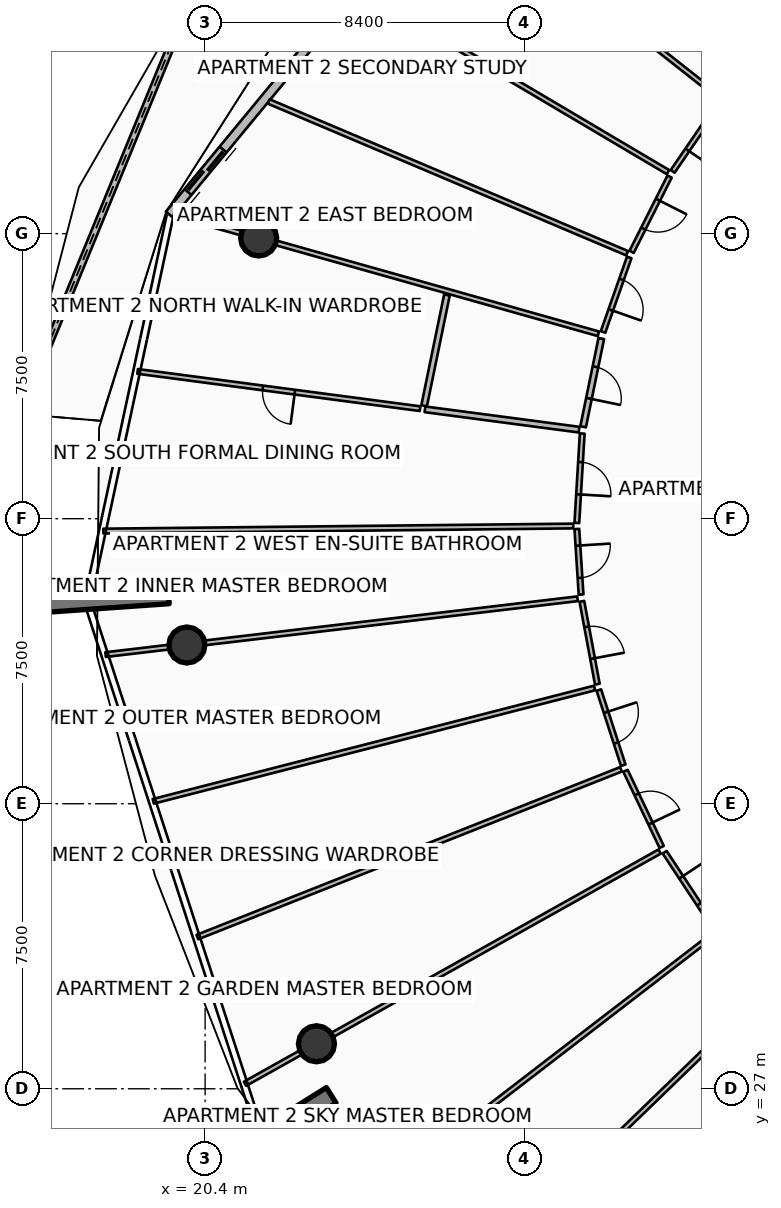
"""IFC4 building model, lengths in metres.
Left out: names, types, materials, properties, quantities, classifications, styles, units other than length and angle.
Written with IfcOpenShell. Run it as: python <this file> out.ifc"""

import sys

from ifc_helpers import new_model, si_unit, direction, frame, frame_2d, origin, origin_2d, place, context, subcontext, project, spatial, polyline, rectangle, circle, outline, extrude, element, fill, save


model = new_model("IFC4")
c1 = context("Model", 3, precision=1e-05, world=origin(), true_north=direction((0.0, 1.0)))
c2 = subcontext(c1, "Body", "Model", "MODEL_VIEW")
j1 = project(units=[si_unit("LENGTHUNIT", "METRE"), si_unit("PLANEANGLEUNIT", "RADIAN")], contexts=[c1])
p1 = place(None, origin())
s1 = spatial("IfcSite", under=j1, at=p1, CompositionType="ELEMENT")
p2 = place(p1, origin())
s2 = spatial("IfcBuilding", under=s1, at=p2, CompositionType="ELEMENT")
p3 = place(p2, frame((0.0, 0.0, 236.7)))
s3 = spatial("IfcBuildingStorey", under=s2, at=p3, CompositionType="ELEMENT", Elevation=236.7)
p4 = place(p3, frame((19.438, 40.003, 0.0), z_axis=(0.0, 0.0, 1.0), x_axis=(-0.997563824095, -0.069759707979, 0.0)))
e1 = element("IfcWall", 1, at=p4, inside=s3, PredefinedType="SOLIDWALL", context=c2, shape_type="SweptSolid", body=[
    extrude(rectangle(XDim=3.5, YDim=0.48, at=frame_2d((1.75, 0.0))), origin(), (0.0, 0.0, 1.0), 3.85),
])
p5 = place(p3, frame((23.719, 26.827, 0.0), z_axis=(0.0, 0.0, 1.0), x_axis=(-0.848033572426, -0.529942506352, 0.0)))
e2 = element("IfcWall", 2, at=p5, inside=s3, PredefinedType="SOLIDWALL", context=c2, shape_type="SweptSolid", body=[
    extrude(rectangle(XDim=3.5, YDim=0.48, at=frame_2d((1.75, 0.0))), origin(), (0.0, 0.0, 1.0), 3.85),
])
for number, where, z_axis, x_axis in (
    (3, (21.809, 49.387, 0.0), (0.0, 0.0, 1.0), (1.0, 0.0, 0.0)),
    (4, (19.92, 38.677, 0.0), (0.0, 0.0, 1.0), (1.0, 0.0, 0.0)),
    (5, (23.33, 28.184, 0.0), (0.0, 0.0, 1.0), (1.0, 0.0, 0.0)),
):
    element("IfcColumn", number, at=place(p3, frame(where, z_axis=z_axis, x_axis=x_axis)), inside=s3, PredefinedType="COLUMN", context=c2, shape_type="SweptSolid", body=[
        extrude(circle(Radius=0.475, at=origin_2d()), origin(), (0.0, 0.0, 1.0), 3.59),
    ])
p6 = place(p3, frame((20.162, 56.05, 0.0), z_axis=(0.0, 0.0, 1.0), x_axis=(-0.3796059491, -0.92514827104, 0.0)))
e6 = element("IfcWall", 6, at=p6, inside=s3, PredefinedType="PARAPET", context=c2, shape_type="SweptSolid", body=[
    extrude(outline(polyline([(0.0, 0.0), (12.209, 0.0), (12.208, 1.497), (6.104, 1.696), (0.0, 1.832), (0.0, 0.0)])), frame((0.0, 0.09, 0.0), z_axis=(0.0, -1.0, 0.0), x_axis=(1.0, 0.0, 0.0)), (0.0, 0.0, 1.0), 0.18),
])
p7 = place(p3, frame((26.742, 58.822, 0.0), z_axis=(0.0, 0.0, 1.0), x_axis=(-0.636680093065, -0.771128043255, 0.0)))
e7 = element("IfcWall", 7, at=p7, inside=s3, PredefinedType="SOLIDWALL", context=c2, shape_type="SweptSolid", body=[
    extrude(rectangle(XDim=11.438, YDim=0.24, at=frame_2d((5.719, 0.0))), origin(), (0.0, 0.0, 1.0), 2.54),
])
p8 = place(p7, frame((9.218, 0.0, 0.0)))
e8 = element("IfcOpeningElement", 8, at=p8, cuts=e7, PredefinedType="OPENING", context=c2, shape_type="SweptSolid", body=[
    extrude(rectangle(XDim=1.45, YDim=2.15, at=frame_2d((0.725, 1.075))), frame((0.0, 0.13, 0.0), z_axis=(0.0, -1.0, 0.0), x_axis=(1.0, 0.0, 0.0)), (0.0, 0.0, 1.0), 0.26),
])
p9 = place(p7, frame((0.28, 0.0, 0.65)))
e9 = element("IfcOpeningElement", 9, at=p9, cuts=e7, PredefinedType="OPENING", context=c2, shape_type="SweptSolid", body=[
    extrude(rectangle(XDim=1.6, YDim=1.5, at=frame_2d((0.8, 0.75))), frame((0.0, 0.13, 0.0), z_axis=(0.0, -1.0, 0.0), x_axis=(1.0, 0.0, 0.0)), (0.0, 0.0, 1.0), 0.26),
])
p10 = place(p3, frame((33.924, 53.097, 0.0), z_axis=(0.0, 0.0, 1.0), x_axis=(-0.785328718296, 0.619078996752, 0.0)))
e10 = element("IfcWall", 10, at=p10, inside=s3, PredefinedType="PARTITIONING", context=c2, shape_type="SweptSolid", body=[
    extrude(rectangle(XDim=9.161, YDim=0.125, at=frame_2d((4.58, 0.0))), origin(), (0.0, 0.0, 1.0), 2.957),
])
p11 = place(p3, frame((32.581, 51.119, 0.0), z_axis=(0.0, 0.0, 1.0), x_axis=(-0.860730955096, 0.509060136859, 0.0)))
e11 = element("IfcWall", 11, at=p11, inside=s3, PredefinedType="PARTITIONING", context=c2, shape_type="SweptSolid", body=[
    extrude(rectangle(XDim=9.397, YDim=0.125, at=frame_2d((4.699, 0.0))), origin(), (0.0, 0.0, 1.0), 3.03),
])
p12 = place(p3, frame((31.504, 48.985, 0.0), z_axis=(0.0, 0.0, 1.0), x_axis=(-0.920847777273, 0.389922262882, 0.0)))
e12 = element("IfcWall", 12, at=p12, inside=s3, PredefinedType="PARTITIONING", context=c2, shape_type="SweptSolid", body=[
    extrude(rectangle(XDim=10.241, YDim=0.125, at=frame_2d((5.121, 0.0))), origin(), (0.0, 0.0, 1.0), 3.03),
])
p13 = place(p3, frame((33.957, 52.969, 0.0), z_axis=(0.0, 0.0, 1.0), x_axis=(-0.565322986845, -0.824869638516, 0.0)))
e13 = element("IfcWall", 13, at=p13, inside=s3, PredefinedType="PARTITIONING", context=c2, shape_type="SweptSolid", body=[
    extrude(rectangle(XDim=2.218, YDim=0.125, at=frame_2d((1.109, 0.0))), origin(), (0.0, 0.0, 1.0), 2.957),
])
p14 = place(p13, frame((0.684, 0.0, 0.0)))
e14 = element("IfcOpeningElement", 14, at=p14, cuts=e13, PredefinedType="OPENING", context=c2, shape_type="SweptSolid", body=[
    extrude(rectangle(XDim=0.85, YDim=2.06, at=frame_2d((0.425, 1.03))), frame((0.0, 0.073, 0.0), z_axis=(0.0, -1.0, 0.0), x_axis=(1.0, 0.0, 0.0)), (0.0, 0.0, 1.0), 0.145),
])
p15 = place(p3, frame((32.622, 51.002, 0.0), z_axis=(0.0, 0.0, 1.0), x_axis=(-0.450512619302, -0.892770059898, 0.0)))
e15 = element("IfcWall", 15, at=p15, inside=s3, PredefinedType="PARTITIONING", context=c2, shape_type="SweptSolid", body=[
    extrude(rectangle(XDim=2.218, YDim=0.125, at=frame_2d((1.109, 0.0))), origin(), (0.0, 0.0, 1.0), 3.03),
])
p16 = place(p15, frame((0.684, 0.0, 0.0)))
e16 = element("IfcOpeningElement", 16, at=p16, cuts=e15, PredefinedType="OPENING", context=c2, shape_type="SweptSolid", body=[
    extrude(rectangle(XDim=0.85, YDim=2.06, at=frame_2d((0.425, 1.03))), frame((0.0, 0.073, 0.0), z_axis=(0.0, -1.0, 0.0), x_axis=(1.0, 0.0, 0.0)), (0.0, 0.0, 1.0), 0.145),
])
p17 = place(p3, frame((31.56, 48.875, 0.0), z_axis=(0.0, 0.0, 1.0), x_axis=(-0.331412511401, -0.943485955002, 0.0)))
e17 = element("IfcWall", 17, at=p17, inside=s3, PredefinedType="PARTITIONING", context=c2, shape_type="SweptSolid", body=[
    extrude(rectangle(XDim=2.078, YDim=0.125, at=frame_2d((1.039, 0.0))), origin(), (0.0, 0.0, 1.0), 2.957),
])
p18 = place(p17, frame((0.614, 0.0, 0.0)))
e18 = element("IfcOpeningElement", 18, at=p18, cuts=e17, PredefinedType="OPENING", context=c2, shape_type="SweptSolid", body=[
    extrude(rectangle(XDim=0.85, YDim=2.06, at=frame_2d((0.425, 1.03))), frame((0.0, 0.073, 0.0), z_axis=(0.0, -1.0, 0.0), x_axis=(1.0, 0.0, 0.0)), (0.0, 0.0, 1.0), 0.145),
])
p19 = place(p3, frame((30.749, 46.865, 0.0), z_axis=(0.0, 0.0, 1.0), x_axis=(-0.962453068054, 0.271448138313, 0.0)))
e19 = element("IfcWall", 19, at=p19, inside=s3, PredefinedType="PARTITIONING", context=c2, shape_type="SweptSolid", body=[
    extrude(rectangle(XDim=11.572, YDim=0.125, at=frame_2d((5.786, 0.0))), origin(), (0.0, 0.0, 1.0), 2.957),
])
p20 = place(p3, frame((30.825, 46.74, 0.0), z_axis=(0.0, 0.0, 1.0), x_axis=(-0.201620944177, -0.979463626108, 0.0)))
e20 = element("IfcWall", 20, at=p20, inside=s3, PredefinedType="PARTITIONING", context=c2, shape_type="SweptSolid", body=[
    extrude(rectangle(XDim=2.37, YDim=0.15, at=frame_2d((1.185, 0.0))), origin(), (0.0, 0.0, 1.0), 2.957),
])
p21 = place(p20, frame((0.76, 0.0, 0.0)))
e21 = element("IfcOpeningElement", 21, at=p21, cuts=e20, PredefinedType="OPENING", context=c2, shape_type="SweptSolid", body=[
    extrude(rectangle(XDim=0.85, YDim=2.06, at=frame_2d((0.425, 1.03))), frame((0.0, 0.085, 0.0), z_axis=(0.0, -1.0, 0.0), x_axis=(1.0, 0.0, 0.0)), (0.0, 0.0, 1.0), 0.17),
])
p22 = place(p3, frame((26.763, 47.886, 0.0), z_axis=(0.0, 0.0, 1.0), x_axis=(-0.20166681044, -0.979454183496, 0.0)))
e22 = element("IfcWall", 22, at=p22, inside=s3, PredefinedType="PARTITIONING", context=c2, shape_type="SweptSolid", body=[
    extrude(rectangle(XDim=2.976, YDim=0.15, at=frame_2d((1.488, 0.0))), origin(), (0.0, 0.0, 1.0), 2.957),
])
p23 = place(p3, frame((30.24, 44.343, 0.0), z_axis=(0.0, 0.0, 1.0), x_axis=(-0.991418703785, 0.130724725227, 0.0)))
e23 = element("IfcWall", 23, at=p23, inside=s3, PredefinedType="PARTITIONING", context=c2, shape_type="SweptSolid", body=[
    extrude(rectangle(XDim=4.09, YDim=0.15, at=frame_2d((2.045, 0.0))), origin(), (0.0, 0.0, 1.0), 3.03),
])
p24 = place(p3, frame((26.056, 44.895, 0.0), z_axis=(0.0, 0.0, 1.0), x_axis=(-0.991410678357, 0.130785575807, 0.0)))
e24 = element("IfcWall", 24, at=p24, inside=s3, PredefinedType="PARTITIONING", context=c2, shape_type="SweptSolid", body=[
    extrude(rectangle(XDim=7.497, YDim=0.125, at=frame_2d((3.749, 0.0))), origin(), (0.0, 0.0, 1.0), 3.03),
])
p25 = place(p24, frame((3.323, 0.0, 0.0)))
e25 = element("IfcOpeningElement", 25, at=p25, cuts=e24, PredefinedType="OPENING", context=c2, shape_type="SweptSolid", body=[
    extrude(rectangle(XDim=0.85, YDim=2.06, at=frame_2d((0.425, 1.03))), frame((0.0, 0.073, 0.0), z_axis=(0.0, -1.0, 0.0), x_axis=(1.0, 0.0, 0.0)), (0.0, 0.0, 1.0), 0.145),
])
p26 = place(p3, frame((30.087, 41.807, 0.0), z_axis=(0.0, 0.0, 1.0), x_axis=(-0.999942101236, -0.010760770184, 0.0)))
e26 = element("IfcWall", 26, at=p26, inside=s3, PredefinedType="PARTITIONING", context=c2, shape_type="SweptSolid", body=[
    extrude(rectangle(XDim=12.365, YDim=0.125, at=frame_2d((6.183, 0.0))), origin(), (0.0, 0.0, 1.0), 3.03),
])
p27 = place(p3, frame((30.324, 44.241, 0.0), z_axis=(0.0, 0.0, 1.0), x_axis=(-0.060172982702, -0.99818796434, 0.0)))
e27 = element("IfcWall", 27, at=p27, inside=s3, PredefinedType="PARTITIONING", context=c2, shape_type="SweptSolid", body=[
    extrude(rectangle(XDim=2.357, YDim=0.125, at=frame_2d((1.179, 0.0))), origin(), (0.0, 0.0, 1.0), 3.03),
])
p28 = place(p27, frame((0.754, 0.0, 0.0)))
e28 = element("IfcOpeningElement", 28, at=p28, cuts=e27, PredefinedType="OPENING", context=c2, shape_type="SweptSolid", body=[
    extrude(rectangle(XDim=0.85, YDim=2.06, at=frame_2d((0.425, 1.03))), frame((0.0, 0.073, 0.0), z_axis=(0.0, -1.0, 0.0), x_axis=(1.0, 0.0, 0.0)), (0.0, 0.0, 1.0), 0.145),
])
p29 = place(p3, frame((30.182, 41.729, 0.0), z_axis=(0.0, 0.0, 1.0), x_axis=(0.064314166279, -0.997929700939, 0.0)))
e29 = element("IfcWall", 29, at=p29, inside=s3, PredefinedType="PARTITIONING", context=c2, shape_type="SweptSolid", body=[
    extrude(rectangle(XDim=1.727, YDim=0.125, at=frame_2d((0.864, 0.0))), origin(), (0.0, 0.0, 1.0), 2.957),
])
p30 = place(p29, frame((0.439, 0.0, 0.0)))
e30 = element("IfcOpeningElement", 30, at=p30, cuts=e29, PredefinedType="OPENING", context=c2, shape_type="SweptSolid", body=[
    extrude(rectangle(XDim=0.85, YDim=2.06, at=frame_2d((0.425, 1.03))), frame((0.0, 0.073, 0.0), z_axis=(0.0, -1.0, 0.0), x_axis=(1.0, 0.0, 0.0)), (0.0, 0.0, 1.0), 0.145),
])
p31 = place(p3, frame((30.2, 39.893, 0.0), z_axis=(0.0, 0.0, 1.0), x_axis=(-0.993067601391, -0.117544625855, 0.0)))
e31 = element("IfcWall", 31, at=p31, inside=s3, PredefinedType="PARTITIONING", context=c2, shape_type="SweptSolid", body=[
    extrude(rectangle(XDim=12.506, YDim=0.125, at=frame_2d((6.253, 0.0))), origin(), (0.0, 0.0, 1.0), 2.957),
])
p32 = place(p3, frame((30.649, 37.545, 0.0), z_axis=(0.0, 0.0, 1.0), x_axis=(-0.968582538379, -0.248692312602, 0.0)))
e32 = element("IfcWall", 32, at=p32, inside=s3, PredefinedType="PARTITIONING", context=c2, shape_type="SweptSolid", body=[
    extrude(rectangle(XDim=11.99, YDim=0.125, at=frame_2d((5.995, 0.0))), origin(), (0.0, 0.0, 1.0), 3.03),
])
p33 = place(p3, frame((31.344, 35.406, 0.0), z_axis=(0.0, 0.0, 1.0), x_axis=(-0.929772783684, -0.368133903248, 0.0)))
e33 = element("IfcWall", 33, at=p33, inside=s3, PredefinedType="PARTITIONING", context=c2, shape_type="SweptSolid", body=[
    extrude(rectangle(XDim=11.99, YDim=0.125, at=frame_2d((5.995, 0.0))), origin(), (0.0, 0.0, 1.0), 3.03),
])
p34 = place(p3, frame((30.314, 39.826, 0.0), z_axis=(0.0, 0.0, 1.0), x_axis=(0.183484349593, -0.983022631202, 0.0)))
e34 = element("IfcWall", 34, at=p34, inside=s3, PredefinedType="PARTITIONING", context=c2, shape_type="SweptSolid", body=[
    extrude(rectangle(XDim=2.218, YDim=0.125, at=frame_2d((1.109, 0.0))), origin(), (0.0, 0.0, 1.0), 2.957),
])
p35 = place(p34, frame((0.684, 0.0, 0.0)))
e35 = element("IfcOpeningElement", 35, at=p35, cuts=e34, PredefinedType="OPENING", context=c2, shape_type="SweptSolid", body=[
    extrude(rectangle(XDim=0.85, YDim=2.06, at=frame_2d((0.425, 1.03))), frame((0.0, 0.073, 0.0), z_axis=(0.0, -1.0, 0.0), x_axis=(1.0, 0.0, 0.0)), (0.0, 0.0, 1.0), 0.145),
])
p36 = place(p3, frame((30.761, 37.491, 0.0), z_axis=(0.0, 0.0, 1.0), x_axis=(0.309064822655, -0.951040974615, 0.0)))
e36 = element("IfcWall", 36, at=p36, inside=s3, PredefinedType="PARTITIONING", context=c2, shape_type="SweptSolid", body=[
    extrude(rectangle(XDim=2.078, YDim=0.125, at=frame_2d((1.039, 0.0))), origin(), (0.0, 0.0, 1.0), 3.03),
])
p37 = place(p36, frame((0.614, 0.0, 0.0)))
e37 = element("IfcOpeningElement", 37, at=p37, cuts=e36, PredefinedType="OPENING", context=c2, shape_type="SweptSolid", body=[
    extrude(rectangle(XDim=0.85, YDim=2.06, at=frame_2d((0.425, 1.03))), frame((0.0, 0.073, 0.0), z_axis=(0.0, -1.0, 0.0), x_axis=(1.0, 0.0, 0.0)), (0.0, 0.0, 1.0), 0.145),
])
p38 = place(p3, frame((31.462, 35.366, 0.0), z_axis=(0.0, 0.0, 1.0), x_axis=(0.429382337396, -0.903122809109, 0.0)))
e38 = element("IfcWall", 38, at=p38, inside=s3, PredefinedType="PARTITIONING", context=c2, shape_type="SweptSolid", body=[
    extrude(rectangle(XDim=2.218, YDim=0.125, at=frame_2d((1.109, 0.0))), origin(), (0.0, 0.0, 1.0), 2.957),
])
p39 = place(p38, frame((0.684, 0.0, 0.0)))
e39 = element("IfcOpeningElement", 39, at=p39, cuts=e38, PredefinedType="OPENING", context=c2, shape_type="SweptSolid", body=[
    extrude(rectangle(XDim=0.85, YDim=2.06, at=frame_2d((0.425, 1.03))), frame((0.0, 0.073, 0.0), z_axis=(0.0, -1.0, 0.0), x_axis=(1.0, 0.0, 0.0)), (0.0, 0.0, 1.0), 0.145),
])
p40 = place(p3, frame((32.361, 33.242, 0.0), z_axis=(0.0, 0.0, 1.0), x_axis=(-0.872493698271, -0.488625364137, 0.0)))
e40 = element("IfcWall", 40, at=p40, inside=s3, PredefinedType="PARTITIONING", context=c2, shape_type="SweptSolid", body=[
    extrude(rectangle(XDim=12.506, YDim=0.125, at=frame_2d((6.253, 0.0))), origin(), (0.0, 0.0, 1.0), 2.957),
])
p41 = place(p3, frame((36.903, 27.924, 0.0), z_axis=(0.0, 0.0, 1.0), x_axis=(-0.619090039254, -0.785320013304, 0.0)))
e41 = element("IfcWall", 41, at=p41, inside=s3, PredefinedType="PARTITIONING", context=c2, shape_type="SweptSolid", body=[
    extrude(rectangle(XDim=11.672, YDim=0.125, at=frame_2d((5.836, 0.0))), origin(), (0.0, 0.0, 1.0), 2.957),
])
p42 = place(p3, frame((33.802, 31.076, 0.0), z_axis=(0.0, 0.0, 1.0), x_axis=(-0.792569355896, -0.609781777437, 0.0)))
e42 = element("IfcWall", 42, at=p42, inside=s3, PredefinedType="PARTITIONING", context=c2, shape_type="SweptSolid", body=[
    extrude(rectangle(XDim=12.128, YDim=0.125, at=frame_2d((6.064, 0.0))), origin(), (0.0, 0.0, 1.0), 3.03),
])
p43 = place(p3, frame((35.135, 29.533, 0.0), z_axis=(0.0, 0.0, 1.0), x_axis=(-0.718126422437, -0.695912667939, 0.0)))
e43 = element("IfcWall", 43, at=p43, inside=s3, PredefinedType="PARTITIONING", context=c2, shape_type="SweptSolid", body=[
    extrude(rectangle(XDim=11.694, YDim=0.125, at=frame_2d((5.847, 0.0))), origin(), (0.0, 0.0, 1.0), 3.03),
])
p44 = place(p3, frame((32.493, 33.224, 0.0), z_axis=(0.0, 0.0, 1.0), x_axis=(0.550632023565, -0.834748090519, 0.0)))
e44 = element("IfcWall", 44, at=p44, inside=s3, PredefinedType="PARTITIONING", context=c2, shape_type="SweptSolid", body=[
    extrude(rectangle(XDim=2.427, YDim=0.125, at=frame_2d((1.214, 0.0))), origin(), (0.0, 0.0, 1.0), 2.957),
])
p45 = place(p44, frame((0.789, 0.0, 0.0)))
e45 = element("IfcOpeningElement", 45, at=p45, cuts=e44, PredefinedType="OPENING", context=c2, shape_type="SweptSolid", body=[
    extrude(rectangle(XDim=0.85, YDim=2.06, at=frame_2d((0.425, 1.03))), frame((0.0, 0.073, 0.0), z_axis=(0.0, -1.0, 0.0), x_axis=(1.0, 0.0, 0.0)), (0.0, 0.0, 1.0), 0.145),
])
p46 = place(p8, origin())
e46 = element("IfcDoor", 46, at=p46, inside=s3, OperationType="DOUBLE_DOOR_SLIDING", PredefinedType="DOOR", context=c2, shape_type="SweptSolid", body=[
    extrude(rectangle(XDim=1.45, YDim=2.15, at=frame_2d((0.725, 1.075))), frame((0.0, 0.025, 0.0), z_axis=(0.0, -1.0, 0.0), x_axis=(1.0, 0.0, 0.0)), (0.0, 0.0, 1.0), 0.05),
])
fill(e8, e46)
p47 = place(p14, origin())
e47 = element("IfcDoor", 47, at=p47, inside=s3, OperationType="SINGLE_SWING_RIGHT", PredefinedType="DOOR", context=c2, shape_type="SweptSolid", body=[
    extrude(rectangle(XDim=0.85, YDim=2.06, at=frame_2d((0.425, 1.03))), frame((0.0, 0.025, 0.0), z_axis=(0.0, -1.0, 0.0), x_axis=(1.0, 0.0, 0.0)), (0.0, 0.0, 1.0), 0.05),
])
fill(e14, e47)
p48 = place(p16, origin())
e48 = element("IfcDoor", 48, at=p48, inside=s3, OperationType="SINGLE_SWING_LEFT", PredefinedType="DOOR", context=c2, shape_type="SweptSolid", body=[
    extrude(rectangle(XDim=0.85, YDim=2.06, at=frame_2d((0.425, 1.03))), frame((0.0, 0.025, 0.0), z_axis=(0.0, -1.0, 0.0), x_axis=(1.0, 0.0, 0.0)), (0.0, 0.0, 1.0), 0.05),
])
fill(e16, e48)
p49 = place(p18, origin())
e49 = element("IfcDoor", 49, at=p49, inside=s3, OperationType="SINGLE_SWING_RIGHT", PredefinedType="DOOR", context=c2, shape_type="SweptSolid", body=[
    extrude(rectangle(XDim=0.85, YDim=2.06, at=frame_2d((0.425, 1.03))), frame((0.0, 0.025, 0.0), z_axis=(0.0, -1.0, 0.0), x_axis=(1.0, 0.0, 0.0)), (0.0, 0.0, 1.0), 0.05),
])
fill(e18, e49)
p50 = place(p21, origin())
e50 = element("IfcDoor", 50, at=p50, inside=s3, OperationType="SINGLE_SWING_RIGHT", PredefinedType="DOOR", context=c2, shape_type="SweptSolid", body=[
    extrude(rectangle(XDim=0.85, YDim=2.06, at=frame_2d((0.425, 1.03))), frame((0.0, 0.025, 0.0), z_axis=(0.0, -1.0, 0.0), x_axis=(1.0, 0.0, 0.0)), (0.0, 0.0, 1.0), 0.05),
])
fill(e21, e50)
p51 = place(p25, origin())
e51 = element("IfcDoor", 51, at=p51, inside=s3, OperationType="SINGLE_SWING_LEFT", PredefinedType="DOOR", context=c2, shape_type="SweptSolid", body=[
    extrude(rectangle(XDim=0.85, YDim=2.06, at=frame_2d((0.425, 1.03))), frame((0.0, 0.025, 0.0), z_axis=(0.0, -1.0, 0.0), x_axis=(1.0, 0.0, 0.0)), (0.0, 0.0, 1.0), 0.05),
])
fill(e25, e51)
p52 = place(p28, origin())
e52 = element("IfcDoor", 52, at=p52, inside=s3, OperationType="SINGLE_SWING_RIGHT", PredefinedType="DOOR", context=c2, shape_type="SweptSolid", body=[
    extrude(rectangle(XDim=0.85, YDim=2.06, at=frame_2d((0.425, 1.03))), frame((0.0, 0.025, 0.0), z_axis=(0.0, -1.0, 0.0), x_axis=(1.0, 0.0, 0.0)), (0.0, 0.0, 1.0), 0.05),
])
fill(e28, e52)
p53 = place(p30, origin())
e53 = element("IfcDoor", 53, at=p53, inside=s3, OperationType="SINGLE_SWING_LEFT", PredefinedType="DOOR", context=c2, shape_type="SweptSolid", body=[
    extrude(rectangle(XDim=0.85, YDim=2.06, at=frame_2d((0.425, 1.03))), frame((0.0, 0.025, 0.0), z_axis=(0.0, -1.0, 0.0), x_axis=(1.0, 0.0, 0.0)), (0.0, 0.0, 1.0), 0.05),
])
fill(e30, e53)
p54 = place(p35, origin())
e54 = element("IfcDoor", 54, at=p54, inside=s3, OperationType="SINGLE_SWING_RIGHT", PredefinedType="DOOR", context=c2, shape_type="SweptSolid", body=[
    extrude(rectangle(XDim=0.85, YDim=2.06, at=frame_2d((0.425, 1.03))), frame((0.0, 0.025, 0.0), z_axis=(0.0, -1.0, 0.0), x_axis=(1.0, 0.0, 0.0)), (0.0, 0.0, 1.0), 0.05),
])
fill(e35, e54)
p55 = place(p37, origin())
e55 = element("IfcDoor", 55, at=p55, inside=s3, OperationType="SINGLE_SWING_LEFT", PredefinedType="DOOR", context=c2, shape_type="SweptSolid", body=[
    extrude(rectangle(XDim=0.85, YDim=2.06, at=frame_2d((0.425, 1.03))), frame((0.0, 0.025, 0.0), z_axis=(0.0, -1.0, 0.0), x_axis=(1.0, 0.0, 0.0)), (0.0, 0.0, 1.0), 0.05),
])
fill(e37, e55)
p56 = place(p39, origin())
e56 = element("IfcDoor", 56, at=p56, inside=s3, OperationType="SINGLE_SWING_RIGHT", PredefinedType="DOOR", context=c2, shape_type="SweptSolid", body=[
    extrude(rectangle(XDim=0.85, YDim=2.06, at=frame_2d((0.425, 1.03))), frame((0.0, 0.025, 0.0), z_axis=(0.0, -1.0, 0.0), x_axis=(1.0, 0.0, 0.0)), (0.0, 0.0, 1.0), 0.05),
])
fill(e39, e56)
p57 = place(p45, origin())
e57 = element("IfcDoor", 57, at=p57, inside=s3, OperationType="SINGLE_SWING_LEFT", PredefinedType="DOOR", context=c2, shape_type="SweptSolid", body=[
    extrude(rectangle(XDim=0.85, YDim=2.06, at=frame_2d((0.425, 1.03))), frame((0.0, 0.025, 0.0), z_axis=(0.0, -1.0, 0.0), x_axis=(1.0, 0.0, 0.0)), (0.0, 0.0, 1.0), 0.05),
])
fill(e45, e57)
save(model, sys.argv[1])
